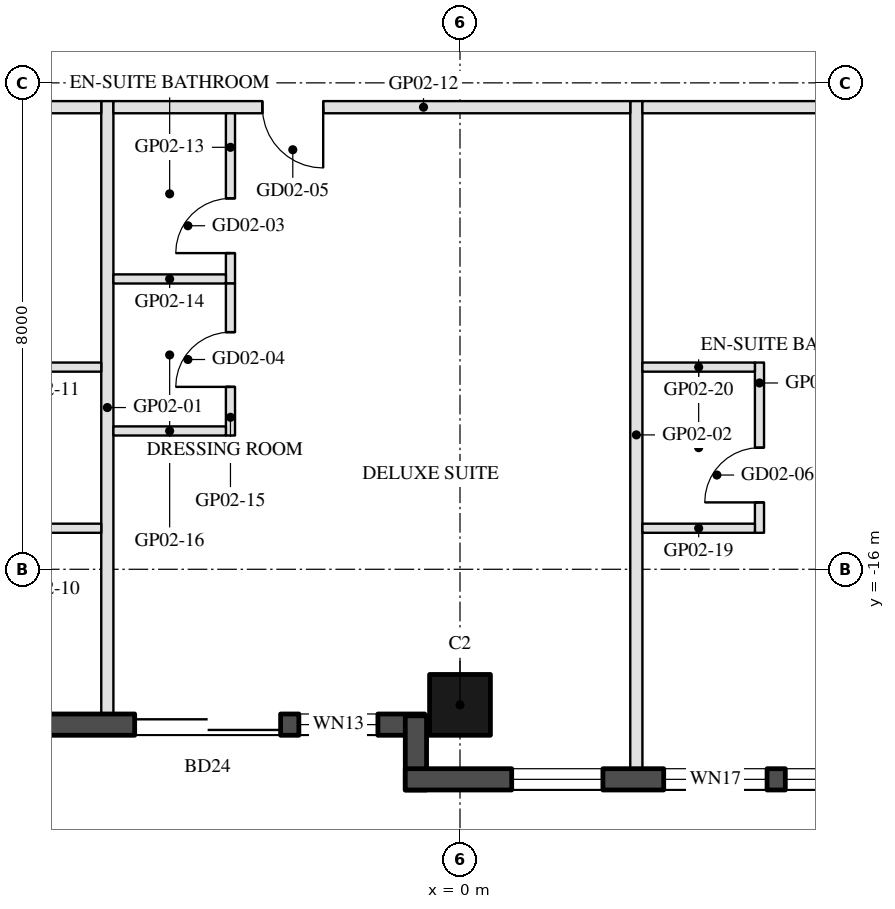
"""IFC4 building model, lengths in metres.
Left out: names, types, materials, properties, quantities, classifications, styles, units other than length and angle.
Written with IfcOpenShell. Run it as: python <this file> out.ifc"""

import sys

from ifc_helpers import new_model, si_unit, direction, frame, frame_2d, origin, origin_2d, place, context, subcontext, project, spatial, rectangle, hollow_rectangle, extrude, element, fill, save


model = new_model("IFC4")
c1 = context("Model", 3, precision=1e-05, world=origin(), true_north=direction((0.0, 1.0)))
c2 = subcontext(c1, "Body", "Model", "MODEL_VIEW")
j1 = project(units=[si_unit("LENGTHUNIT", "METRE"), si_unit("PLANEANGLEUNIT", "RADIAN")], contexts=[c1])
p1 = place(None, origin())
s1 = spatial("IfcSite", under=j1, at=p1, CompositionType="ELEMENT")
p2 = place(p1, origin())
s2 = spatial("IfcBuilding", under=s1, at=p2, CompositionType="ELEMENT")
p3 = place(p2, frame((0.0, 0.0, 57.6)))
s3 = spatial("IfcBuildingStorey", under=s2, at=p3, CompositionType="ELEMENT", Elevation=57.6)
p4 = place(p3, frame((0.0, -18.23, 0.0), z_axis=(0.0, 0.0, 1.0), x_axis=(-1.0, 0.0, 0.0)))
e1 = element("IfcColumn", 1, at=p4, inside=s3, PredefinedType="COLUMN", context=c2, shape_type="SweptSolid", body=[
    extrude(hollow_rectangle(XDim=1.0, YDim=1.0, WallThickness=0.045, at=origin_2d()), origin(), (0.0, 0.0, 1.0), 3.7),
])
p5 = place(p3, frame((-7.32, -18.555, 0.0), z_axis=(0.0, 0.0, 1.0), x_axis=(1.0, 0.0, 0.0)))
e2 = element("IfcWall", 2, at=p5, inside=s3, PredefinedType="SOLIDWALL", context=c2, shape_type="SweptSolid", body=[
    extrude(rectangle(XDim=6.74, YDim=0.35, at=frame_2d((3.37, 0.0))), origin(), (0.0, 0.0, 1.0), 3.55),
])
p6 = place(p5, frame((1.97, 0.0, 0.0)))
e3 = element("IfcOpeningElement", 3, at=p6, cuts=e2, PredefinedType="OPENING", context=c2, shape_type="SweptSolid", body=[
    extrude(rectangle(XDim=2.4, YDim=2.4, at=frame_2d((1.2, 1.2))), frame((0.0, 0.185, 0.0), z_axis=(0.0, -1.0, 0.0), x_axis=(1.0, 0.0, 0.0)), (0.0, 0.0, 1.0), 0.37),
])
p7 = place(p5, frame((4.67, 0.0, 0.3)))
e4 = element("IfcOpeningElement", 4, at=p7, cuts=e2, PredefinedType="OPENING", context=c2, shape_type="SweptSolid", body=[
    extrude(rectangle(XDim=1.3, YDim=2.65, at=frame_2d((0.65, 1.325))), frame((0.0, 0.185, 0.0), z_axis=(0.0, -1.0, 0.0), x_axis=(1.0, 0.0, 0.0)), (0.0, 0.0, 1.0), 0.37),
])
p8 = place(p3, frame((-0.725, -18.41, 0.0), z_axis=(0.0, 0.0, 1.0), x_axis=(0.0, -1.0, 0.0)))
e5 = element("IfcWall", 5, at=p8, inside=s3, PredefinedType="SOLIDWALL", context=c2, shape_type="SweptSolid", body=[
    extrude(rectangle(XDim=1.22, YDim=0.35, at=frame_2d((0.61, 0.0))), origin(), (0.0, 0.0, 1.0), 3.55),
])
p9 = place(p3, frame((-0.9, -19.455, 0.0), z_axis=(0.0, 0.0, 1.0), x_axis=(1.0, 0.0, 0.0)))
e6 = element("IfcWall", 6, at=p9, inside=s3, PredefinedType="SOLIDWALL", context=c2, shape_type="SweptSolid", body=[
    extrude(rectangle(XDim=9.7, YDim=0.35, at=frame_2d((4.85, 0.0))), origin(), (0.0, 0.0, 1.0), 3.55),
])
p10 = place(p9, frame((1.75, 0.0, 0.3)))
e7 = element("IfcOpeningElement", 7, at=p10, cuts=e6, PredefinedType="OPENING", context=c2, shape_type="SweptSolid", body=[
    extrude(rectangle(XDim=1.5, YDim=2.65, at=frame_2d((0.75, 1.325))), frame((0.0, 0.185, 0.0), z_axis=(0.0, -1.0, 0.0), x_axis=(1.0, 0.0, 0.0)), (0.0, 0.0, 1.0), 0.37),
])
p11 = place(p9, frame((4.25, 0.0, 0.3)))
e8 = element("IfcOpeningElement", 8, at=p11, cuts=e6, PredefinedType="OPENING", context=c2, shape_type="SweptSolid", body=[
    extrude(rectangle(XDim=1.7, YDim=2.65, at=frame_2d((0.85, 1.325))), frame((0.0, 0.185, 0.0), z_axis=(0.0, -1.0, 0.0), x_axis=(1.0, 0.0, 0.0)), (0.0, 0.0, 1.0), 0.37),
])
p12 = place(p9, frame((6.25, 0.0, 0.3)))
e9 = element("IfcOpeningElement", 9, at=p12, cuts=e6, PredefinedType="OPENING", context=c2, shape_type="SweptSolid", body=[
    extrude(rectangle(XDim=1.7, YDim=2.65, at=frame_2d((0.85, 1.325))), frame((0.0, 0.185, 0.0), z_axis=(0.0, -1.0, 0.0), x_axis=(1.0, 0.0, 0.0)), (0.0, 0.0, 1.0), 0.37),
])
p13 = place(p3, frame((-5.8, -18.38, 0.0), z_axis=(0.0, 0.0, 1.0), x_axis=(0.0, 1.0, 0.0)))
e10 = element("IfcWall", 10, at=p13, inside=s3, PredefinedType="PARTITIONING", context=c2, shape_type="SweptSolid", body=[
    extrude(rectangle(XDim=10.08, YDim=0.2, at=frame_2d((5.04, 0.0))), origin(), (0.0, 0.0, 1.0), 2.96),
])
p14 = place(p3, frame((2.9, -19.28, 0.0), z_axis=(0.0, 0.0, 1.0), x_axis=(0.0, 1.0, 0.0)))
e11 = element("IfcWall", 11, at=p14, inside=s3, PredefinedType="PARTITIONING", context=c2, shape_type="SweptSolid", body=[
    extrude(rectangle(XDim=10.98, YDim=0.2, at=frame_2d((5.49, 0.0))), origin(), (0.0, 0.0, 1.0), 2.96),
])
p15 = place(p3, frame((-5.9, -8.4, 0.0), z_axis=(0.0, 0.0, 1.0), x_axis=(-1.0, 0.0, 0.0)))
e12 = element("IfcWall", 12, at=p15, inside=s3, PredefinedType="PARTITIONING", context=c2, shape_type="SweptSolid", body=[
    extrude(rectangle(XDim=4.088, YDim=0.2, at=frame_2d((2.044, 0.0))), origin(), (0.0, 0.0, 1.0), 2.95),
])
p16 = place(p15, frame((1.544, 0.0, 0.0)))
e13 = element("IfcOpeningElement", 13, at=p16, cuts=e12, PredefinedType="OPENING", context=c2, shape_type="SweptSolid", body=[
    extrude(rectangle(XDim=1.0, YDim=2.1, at=frame_2d((0.5, 1.05))), frame((0.0, 0.11, 0.0), z_axis=(0.0, -1.0, 0.0), x_axis=(1.0, 0.0, 0.0)), (0.0, 0.0, 1.0), 0.22),
])
for number, where, z_axis, x_axis in (
    (14, (-7.75, -15.325, 0.0), (0.0, 0.0, 1.0), (1.0, 0.0, 0.0)),
    (15, (-7.75, -12.675, 0.0), (0.0, 0.0, 1.0), (1.0, 0.0, 0.0)),
):
    element("IfcWall", number, at=place(p3, frame(where, z_axis=z_axis, x_axis=x_axis)), inside=s3, PredefinedType="PARTITIONING", context=c2, shape_type="SweptSolid", body=[
        extrude(rectangle(XDim=1.85, YDim=0.15, at=frame_2d((0.925, 0.0))), origin(), (0.0, 0.0, 1.0), 3.55),
    ])
p17 = place(p3, frame((2.8, -8.4, 0.0), z_axis=(0.0, 0.0, 1.0), x_axis=(-1.0, 0.0, 0.0)))
e16 = element("IfcWall", 16, at=p17, inside=s3, PredefinedType="PARTITIONING", context=c2, shape_type="SweptSolid", body=[
    extrude(rectangle(XDim=8.5, YDim=0.2, at=frame_2d((4.25, 0.0))), origin(), (0.0, 0.0, 1.0), 2.95),
])
p18 = place(p17, frame((5.05, 0.0, 0.0)))
e17 = element("IfcOpeningElement", 17, at=p18, cuts=e16, PredefinedType="OPENING", context=c2, shape_type="SweptSolid", body=[
    extrude(rectangle(XDim=1.0, YDim=2.1, at=frame_2d((0.5, 1.05))), frame((0.0, 0.11, 0.0), z_axis=(0.0, -1.0, 0.0), x_axis=(1.0, 0.0, 0.0)), (0.0, 0.0, 1.0), 0.22),
])
p19 = place(p3, frame((-3.775, -11.3, 0.0), z_axis=(0.0, 0.0, 1.0), x_axis=(0.0, 1.0, 0.0)))
e18 = element("IfcWall", 18, at=p19, inside=s3, PredefinedType="PARTITIONING", context=c2, shape_type="SweptSolid", body=[
    extrude(rectangle(XDim=2.8, YDim=0.15, at=frame_2d((1.4, 0.0))), origin(), (0.0, 0.0, 1.0), 2.95),
])
p20 = place(p19, frame((0.5, 0.0, 0.0)))
e19 = element("IfcOpeningElement", 19, at=p20, cuts=e18, PredefinedType="OPENING", context=c2, shape_type="SweptSolid", body=[
    extrude(rectangle(XDim=0.9, YDim=2.1, at=frame_2d((0.45, 1.05))), frame((0.0, 0.085, 0.0), z_axis=(0.0, -1.0, 0.0), x_axis=(1.0, 0.0, 0.0)), (0.0, 0.0, 1.0), 0.17),
])
p21 = place(p3, frame((-5.7, -11.225, 0.0), z_axis=(0.0, 0.0, 1.0), x_axis=(1.0, 0.0, 0.0)))
e20 = element("IfcWall", 20, at=p21, inside=s3, PredefinedType="PARTITIONING", context=c2, shape_type="SweptSolid", body=[
    extrude(rectangle(XDim=1.85, YDim=0.15, at=frame_2d((0.925, 0.0))), origin(), (0.0, 0.0, 1.0), 2.95),
])
p22 = place(p3, frame((-3.775, -13.8, 0.0), z_axis=(0.0, 0.0, 1.0), x_axis=(0.0, 1.0, 0.0)))
e21 = element("IfcWall", 21, at=p22, inside=s3, PredefinedType="PARTITIONING", context=c2, shape_type="SweptSolid", body=[
    extrude(rectangle(XDim=2.5, YDim=0.15, at=frame_2d((1.25, 0.0))), origin(), (0.0, 0.0, 1.0), 2.95),
])
p23 = place(p22, frame((0.8, 0.0, 0.0)))
e22 = element("IfcOpeningElement", 22, at=p23, cuts=e21, PredefinedType="OPENING", context=c2, shape_type="SweptSolid", body=[
    extrude(rectangle(XDim=0.9, YDim=2.1, at=frame_2d((0.45, 1.05))), frame((0.0, 0.085, 0.0), z_axis=(0.0, -1.0, 0.0), x_axis=(1.0, 0.0, 0.0)), (0.0, 0.0, 1.0), 0.17),
])
p24 = place(p3, frame((-5.7, -13.725, 0.0), z_axis=(0.0, 0.0, 1.0), x_axis=(1.0, 0.0, 0.0)))
e23 = element("IfcWall", 23, at=p24, inside=s3, PredefinedType="PARTITIONING", context=c2, shape_type="SweptSolid", body=[
    extrude(rectangle(XDim=1.85, YDim=0.15, at=frame_2d((0.925, 0.0))), origin(), (0.0, 0.0, 1.0), 2.95),
])
p25 = place(p3, frame((9.988, -8.4, 0.0), z_axis=(0.0, 0.0, 1.0), x_axis=(-1.0, 0.0, 0.0)))
e24 = element("IfcWall", 24, at=p25, inside=s3, PredefinedType="PARTITIONING", context=c2, shape_type="SweptSolid", body=[
    extrude(rectangle(XDim=6.988, YDim=0.2, at=frame_2d((3.494, 0.0))), origin(), (0.0, 0.0, 1.0), 2.95),
])
p26 = place(p25, frame((2.994, 0.0, 0.0)))
e25 = element("IfcOpeningElement", 25, at=p26, cuts=e24, PredefinedType="OPENING", context=c2, shape_type="SweptSolid", body=[
    extrude(rectangle(XDim=1.0, YDim=2.1, at=frame_2d((0.5, 1.05))), frame((0.0, 0.11, 0.0), z_axis=(0.0, -1.0, 0.0), x_axis=(1.0, 0.0, 0.0)), (0.0, 0.0, 1.0), 0.22),
])
p27 = place(p3, frame((4.925, -15.4, 0.0), z_axis=(0.0, 0.0, 1.0), x_axis=(0.0, 1.0, 0.0)))
e26 = element("IfcWall", 26, at=p27, inside=s3, PredefinedType="PARTITIONING", context=c2, shape_type="SweptSolid", body=[
    extrude(rectangle(XDim=2.8, YDim=0.15, at=frame_2d((1.4, 0.0))), origin(), (0.0, 0.0, 1.0), 3.55),
])
p28 = place(p27, frame((0.5, 0.0, 0.0)))
e27 = element("IfcOpeningElement", 27, at=p28, cuts=e26, PredefinedType="OPENING", context=c2, shape_type="SweptSolid", body=[
    extrude(rectangle(XDim=0.9, YDim=2.1, at=frame_2d((0.45, 1.05))), frame((0.0, 0.085, 0.0), z_axis=(0.0, -1.0, 0.0), x_axis=(1.0, 0.0, 0.0)), (0.0, 0.0, 1.0), 0.17),
])
for number, where, z_axis, x_axis in (
    (28, (3.0, -15.325, 0.0), (0.0, 0.0, 1.0), (1.0, 0.0, 0.0)),
    (29, (3.0, -12.675, 0.0), (0.0, 0.0, 1.0), (1.0, 0.0, 0.0)),
):
    element("IfcWall", number, at=place(p3, frame(where, z_axis=z_axis, x_axis=x_axis)), inside=s3, PredefinedType="PARTITIONING", context=c2, shape_type="SweptSolid", body=[
        extrude(rectangle(XDim=1.85, YDim=0.15, at=frame_2d((0.925, 0.0))), origin(), (0.0, 0.0, 1.0), 2.95),
    ])
p29 = place(p6, frame((2.4, 0.0, 0.0), z_axis=(0.0, 0.0, 1.0), x_axis=(-1.0, 0.0, 0.0)))
e30 = element("IfcDoor", 30, at=p29, inside=s3, OperationType="SLIDING_TO_LEFT", PredefinedType="DOOR", context=c2, shape_type="SweptSolid", body=[
    extrude(rectangle(XDim=2.4, YDim=2.4, at=frame_2d((1.2, 1.2))), frame((0.0, 0.025, 0.0), z_axis=(0.0, -1.0, 0.0), x_axis=(1.0, 0.0, 0.0)), (0.0, 0.0, 1.0), 0.05),
])
fill(e3, e30)
p30 = place(p7, origin())
e31 = element("IfcWindow", 31, at=p30, inside=s3, PartitioningType="SINGLE_PANEL", PredefinedType="WINDOW", context=c2, shape_type="SweptSolid", body=[
    extrude(rectangle(XDim=1.3, YDim=2.65, at=frame_2d((0.65, 1.325))), frame((0.0, 0.03, 0.0), z_axis=(0.0, -1.0, 0.0), x_axis=(1.0, 0.0, 0.0)), (0.0, 0.0, 1.0), 0.06),
])
fill(e4, e31)
p31 = place(p10, origin())
e32 = element("IfcWindow", 32, at=p31, inside=s3, PartitioningType="SINGLE_PANEL", PredefinedType="WINDOW", context=c2, shape_type="SweptSolid", body=[
    extrude(rectangle(XDim=1.5, YDim=2.65, at=frame_2d((0.75, 1.325))), frame((0.0, 0.03, 0.0), z_axis=(0.0, -1.0, 0.0), x_axis=(1.0, 0.0, 0.0)), (0.0, 0.0, 1.0), 0.06),
])
fill(e7, e32)
p32 = place(p11, origin())
e33 = element("IfcWindow", 33, at=p32, inside=s3, PartitioningType="SINGLE_PANEL", PredefinedType="WINDOW", context=c2, shape_type="SweptSolid", body=[
    extrude(rectangle(XDim=1.7, YDim=2.65, at=frame_2d((0.85, 1.325))), frame((0.0, 0.03, 0.0), z_axis=(0.0, -1.0, 0.0), x_axis=(1.0, 0.0, 0.0)), (0.0, 0.0, 1.0), 0.06),
])
fill(e8, e33)
p33 = place(p12, origin())
e34 = element("IfcWindow", 34, at=p33, inside=s3, PartitioningType="SINGLE_PANEL", PredefinedType="WINDOW", context=c2, shape_type="SweptSolid", body=[
    extrude(rectangle(XDim=1.7, YDim=2.65, at=frame_2d((0.85, 1.325))), frame((0.0, 0.03, 0.0), z_axis=(0.0, -1.0, 0.0), x_axis=(1.0, 0.0, 0.0)), (0.0, 0.0, 1.0), 0.06),
])
fill(e9, e34)
p34 = place(p20, origin())
e35 = element("IfcDoor", 35, at=p34, inside=s3, OperationType="SINGLE_SWING_LEFT", PredefinedType="DOOR", context=c2, shape_type="SweptSolid", body=[
    extrude(rectangle(XDim=0.9, YDim=2.1, at=frame_2d((0.45, 1.05))), frame((0.0, 0.025, 0.0), z_axis=(0.0, -1.0, 0.0), x_axis=(1.0, 0.0, 0.0)), (0.0, 0.0, 1.0), 0.05),
])
fill(e19, e35)
p35 = place(p23, origin())
e36 = element("IfcDoor", 36, at=p35, inside=s3, OperationType="SINGLE_SWING_LEFT", PredefinedType="DOOR", context=c2, shape_type="SweptSolid", body=[
    extrude(rectangle(XDim=0.9, YDim=2.1, at=frame_2d((0.45, 1.05))), frame((0.0, 0.025, 0.0), z_axis=(0.0, -1.0, 0.0), x_axis=(1.0, 0.0, 0.0)), (0.0, 0.0, 1.0), 0.05),
])
fill(e22, e36)
p36 = place(p18, origin())
e37 = element("IfcDoor", 37, at=p36, inside=s3, OperationType="SINGLE_SWING_LEFT", PredefinedType="DOOR", context=c2, shape_type="SweptSolid", body=[
    extrude(rectangle(XDim=1.0, YDim=2.1, at=frame_2d((0.5, 1.05))), frame((0.0, 0.025, 0.0), z_axis=(0.0, -1.0, 0.0), x_axis=(1.0, 0.0, 0.0)), (0.0, 0.0, 1.0), 0.05),
])
fill(e17, e37)
p37 = place(p28, origin())
e38 = element("IfcDoor", 38, at=p37, inside=s3, OperationType="SINGLE_SWING_LEFT", PredefinedType="DOOR", context=c2, shape_type="SweptSolid", body=[
    extrude(rectangle(XDim=0.9, YDim=2.1, at=frame_2d((0.45, 1.05))), frame((0.0, 0.025, 0.0), z_axis=(0.0, -1.0, 0.0), x_axis=(1.0, 0.0, 0.0)), (0.0, 0.0, 1.0), 0.05),
])
fill(e27, e38)
save(model, sys.argv[1])
